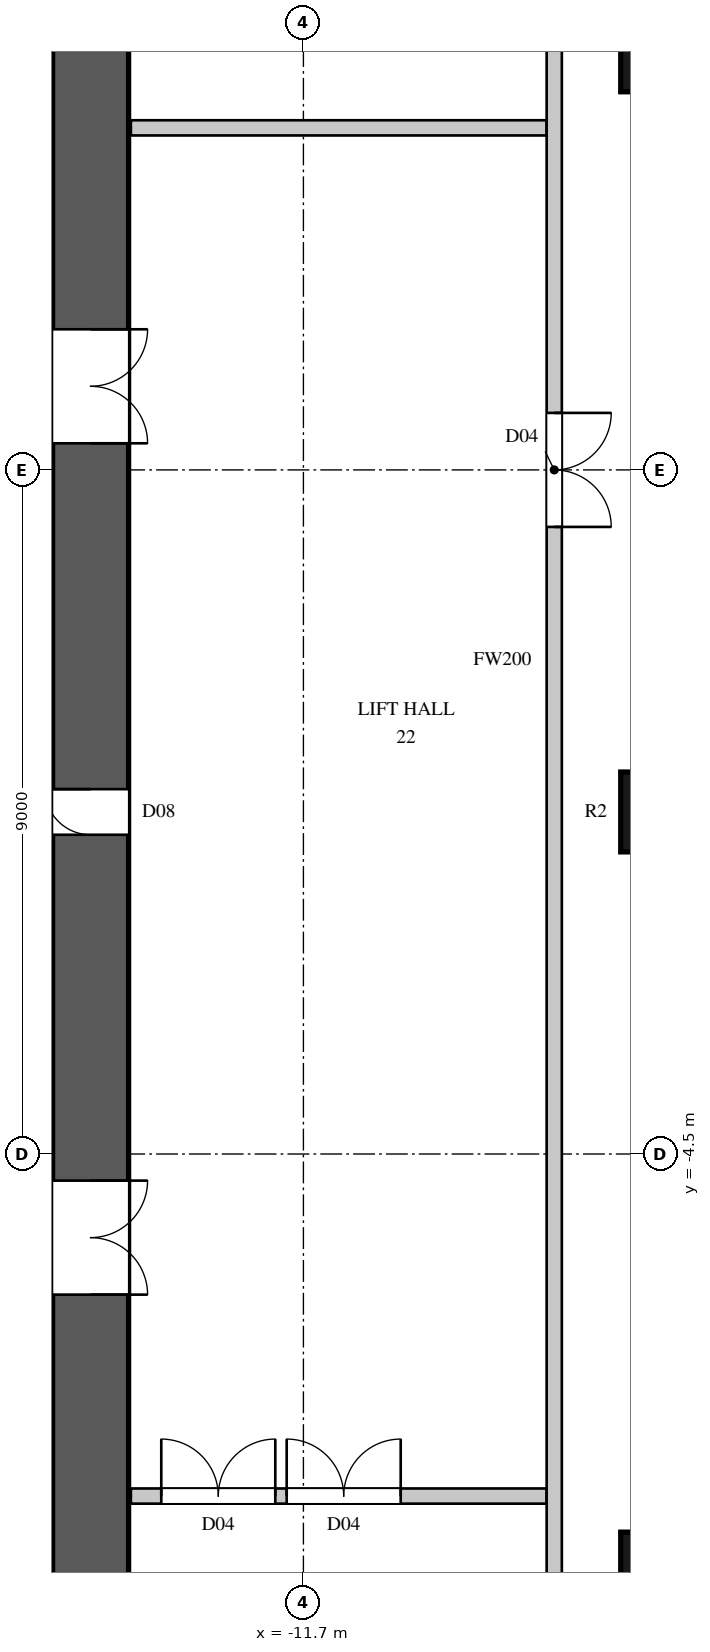
"""IFC4 building model, lengths in metres.
Left out: names, types, materials, properties, quantities, classifications, styles, units other than length and angle.
Written with IfcOpenShell. Run it as: python <this file> out.ifc"""

import sys

from ifc_helpers import new_model, si_unit, direction, frame, frame_2d, origin, origin_2d, place, context, subcontext, project, spatial, rectangle, circle, extrude, element, fill, save


model = new_model("IFC4")
c1 = context("Model", 3, precision=1e-05, world=origin(), true_north=direction((0.0, 1.0)))
c2 = subcontext(c1, "Body", "Model", "MODEL_VIEW")
j1 = project(units=[si_unit("LENGTHUNIT", "METRE"), si_unit("PLANEANGLEUNIT", "RADIAN")], contexts=[c1])
p1 = place(None, origin())
s1 = spatial("IfcSite", under=j1, at=p1, CompositionType="ELEMENT")
p2 = place(p1, origin())
s2 = spatial("IfcBuilding", under=s1, at=p2, CompositionType="ELEMENT")
p3 = place(p2, frame((0.0, 0.0, 109.5)))
s3 = spatial("IfcBuildingStorey", under=s2, at=p3, CompositionType="ELEMENT", Elevation=109.5)
for number, where, z_axis, x_axis in (
    (1, (-7.0, -10.0, 0.0), (0.0, 0.0, 1.0), (1.0, 0.0, 0.0)),
    (2, (-7.0, 0.0, 0.0), (0.0, 0.0, 1.0), (1.0, 0.0, 0.0)),
    (3, (-7.0, 10.0, 0.0), (0.0, 0.0, 1.0), (1.0, 0.0, 0.0)),
):
    element("IfcColumn", number, at=place(p3, frame(where, z_axis=z_axis, x_axis=x_axis)), inside=s3, PredefinedType="COLUMN", context=c2, shape_type="SweptSolid", body=[
        extrude(circle(Radius=0.525, at=origin_2d()), origin(), (0.0, 0.0, 1.0), 3.6),
    ])
p4 = place(p3, frame((-14.5, -14.8, 0.0), z_axis=(0.0, 0.0, 1.0), x_axis=(0.0, 1.0, 0.0)))
e4 = element("IfcWall", 4, at=p4, inside=s3, PredefinedType="SHEAR", context=c2, shape_type="SweptSolid", body=[
    extrude(rectangle(XDim=29.6, YDim=1.0, at=frame_2d((14.8, 0.0))), origin(), (0.0, 0.0, 1.0), 3.6),
])
p5 = place(p4, frame((8.45, 0.0, 0.0)))
e5 = element("IfcOpeningElement", 5, at=p5, cuts=e4, PredefinedType="OPENING", context=c2, shape_type="SweptSolid", body=[
    extrude(rectangle(XDim=1.5, YDim=2.4, at=frame_2d((0.75, 1.2))), frame((0.0, 0.51, 0.0), z_axis=(0.0, -1.0, 0.0), x_axis=(1.0, 0.0, 0.0)), (0.0, 0.0, 1.0), 1.02),
])
p6 = place(p4, frame((19.65, 0.0, 0.0)))
e6 = element("IfcOpeningElement", 6, at=p6, cuts=e4, PredefinedType="OPENING", context=c2, shape_type="SweptSolid", body=[
    extrude(rectangle(XDim=1.5, YDim=2.4, at=frame_2d((0.75, 1.2))), frame((0.0, 0.51, 0.0), z_axis=(0.0, -1.0, 0.0), x_axis=(1.0, 0.0, 0.0)), (0.0, 0.0, 1.0), 1.02),
])
p7 = place(p4, frame((14.5, 0.0, 0.0)))
e7 = element("IfcOpeningElement", 7, at=p7, cuts=e4, PredefinedType="OPENING", context=c2, shape_type="SweptSolid", body=[
    extrude(rectangle(XDim=0.6, YDim=2.0, at=frame_2d((0.3, 1.0))), frame((0.0, 0.51, 0.0), z_axis=(0.0, -1.0, 0.0), x_axis=(1.0, 0.0, 0.0)), (0.0, 0.0, 1.0), 1.02),
])
p8 = place(p3, frame((-13.97, -9.0, 0.0), z_axis=(0.0, 0.0, 1.0), x_axis=(1.0, 0.0, 0.0)))
e8 = element("IfcWall", 8, at=p8, inside=s3, PredefinedType="PARTITIONING", context=c2, shape_type="SweptSolid", body=[
    extrude(rectangle(XDim=5.47, YDim=0.2, at=frame_2d((2.735, 0.0))), origin(), (0.0, 0.0, 1.0), 3.3),
])
p9 = place(p8, frame((0.4, 0.0, 0.0)))
e9 = element("IfcOpeningElement", 9, at=p9, cuts=e8, PredefinedType="OPENING", context=c2, shape_type="SweptSolid", body=[
    extrude(rectangle(XDim=1.5, YDim=2.2, at=frame_2d((0.75, 1.1))), frame((0.0, 0.11, 0.0), z_axis=(0.0, -1.0, 0.0), x_axis=(1.0, 0.0, 0.0)), (0.0, 0.0, 1.0), 0.22),
])
p10 = place(p8, frame((2.05, 0.0, 0.0)))
e10 = element("IfcOpeningElement", 10, at=p10, cuts=e8, PredefinedType="OPENING", context=c2, shape_type="SweptSolid", body=[
    extrude(rectangle(XDim=1.5, YDim=2.2, at=frame_2d((0.75, 1.1))), frame((0.0, 0.11, 0.0), z_axis=(0.0, -1.0, 0.0), x_axis=(1.0, 0.0, 0.0)), (0.0, 0.0, 1.0), 0.22),
])
p11 = place(p3, frame((-13.97, 9.0, 0.0), z_axis=(0.0, 0.0, 1.0), x_axis=(1.0, 0.0, 0.0)))
e11 = element("IfcWall", 11, at=p11, inside=s3, PredefinedType="PARTITIONING", context=c2, shape_type="SweptSolid", body=[
    extrude(rectangle(XDim=5.47, YDim=0.2, at=frame_2d((2.735, 0.0))), origin(), (0.0, 0.0, 1.0), 3.3),
])
p12 = place(p3, frame((-8.4, -11.3, 0.0), z_axis=(0.0, 0.0, 1.0), x_axis=(0.0, 1.0, 0.0)))
e12 = element("IfcWall", 12, at=p12, inside=s3, PredefinedType="PARTITIONING", context=c2, shape_type="SweptSolid", body=[
    extrude(rectangle(XDim=26.6, YDim=0.2, at=frame_2d((13.3, 0.0))), origin(), (0.0, 0.0, 1.0), 3.3),
])
p13 = place(p12, frame((15.05, 0.0, 0.0)))
e13 = element("IfcOpeningElement", 13, at=p13, cuts=e12, PredefinedType="OPENING", context=c2, shape_type="SweptSolid", body=[
    extrude(rectangle(XDim=1.5, YDim=2.2, at=frame_2d((0.75, 1.1))), frame((0.0, 0.11, 0.0), z_axis=(0.0, -1.0, 0.0), x_axis=(1.0, 0.0, 0.0)), (0.0, 0.0, 1.0), 0.22),
])
p14 = place(p12, frame((25.55, 0.0, 0.0)))
e14 = element("IfcOpeningElement", 14, at=p14, cuts=e12, PredefinedType="OPENING", context=c2, shape_type="SweptSolid", body=[
    extrude(rectangle(XDim=0.9, YDim=2.2, at=frame_2d((0.45, 1.1))), frame((0.0, 0.11, 0.0), z_axis=(0.0, -1.0, 0.0), x_axis=(1.0, 0.0, 0.0)), (0.0, 0.0, 1.0), 0.22),
])
p15 = place(p13, origin())
e15 = element("IfcDoor", 15, at=p15, inside=s3, OperationType="DOUBLE_DOOR_SINGLE_SWING", PredefinedType="DOOR", context=c2, shape_type="SweptSolid", body=[
    extrude(rectangle(XDim=1.5, YDim=2.2, at=frame_2d((0.75, 1.1))), frame((0.0, 0.025, 0.0), z_axis=(0.0, -1.0, 0.0), x_axis=(1.0, 0.0, 0.0)), (0.0, 0.0, 1.0), 0.05),
])
fill(e13, e15)
p16 = place(p9, origin())
e16 = element("IfcDoor", 16, at=p16, inside=s3, OperationType="DOUBLE_DOOR_SINGLE_SWING", PredefinedType="DOOR", context=c2, shape_type="SweptSolid", body=[
    extrude(rectangle(XDim=1.5, YDim=2.2, at=frame_2d((0.75, 1.1))), frame((0.0, 0.025, 0.0), z_axis=(0.0, -1.0, 0.0), x_axis=(1.0, 0.0, 0.0)), (0.0, 0.0, 1.0), 0.05),
])
fill(e9, e16)
p17 = place(p10, origin())
e17 = element("IfcDoor", 17, at=p17, inside=s3, OperationType="DOUBLE_DOOR_SINGLE_SWING", PredefinedType="DOOR", context=c2, shape_type="SweptSolid", body=[
    extrude(rectangle(XDim=1.5, YDim=2.2, at=frame_2d((0.75, 1.1))), frame((0.0, 0.025, 0.0), z_axis=(0.0, -1.0, 0.0), x_axis=(1.0, 0.0, 0.0)), (0.0, 0.0, 1.0), 0.05),
])
fill(e10, e17)
p18 = place(p5, origin())
e18 = element("IfcDoor", 18, at=p18, inside=s3, OperationType="DOUBLE_DOOR_SINGLE_SWING", PredefinedType="DOOR", context=c2, shape_type="SweptSolid", body=[
    extrude(rectangle(XDim=1.5, YDim=2.4, at=frame_2d((0.75, 1.2))), frame((0.0, -0.445, 0.0), z_axis=(0.0, -1.0, 0.0), x_axis=(1.0, 0.0, 0.0)), (0.0, 0.0, 1.0), 0.05),
])
fill(e5, e18)
p19 = place(p6, origin())
e19 = element("IfcDoor", 19, at=p19, inside=s3, OperationType="DOUBLE_DOOR_SINGLE_SWING", PredefinedType="DOOR", context=c2, shape_type="SweptSolid", body=[
    extrude(rectangle(XDim=1.5, YDim=2.4, at=frame_2d((0.75, 1.2))), frame((0.0, -0.445, 0.0), z_axis=(0.0, -1.0, 0.0), x_axis=(1.0, 0.0, 0.0)), (0.0, 0.0, 1.0), 0.05),
])
fill(e6, e19)
p20 = place(p7, origin())
e20 = element("IfcDoor", 20, at=p20, inside=s3, OperationType="SINGLE_SWING_RIGHT", PredefinedType="DOOR", context=c2, shape_type="SweptSolid", body=[
    extrude(rectangle(XDim=0.6, YDim=2.0, at=frame_2d((0.3, 1.0))), frame((0.0, 0.495, 0.0), z_axis=(0.0, -1.0, 0.0), x_axis=(1.0, 0.0, 0.0)), (0.0, 0.0, 1.0), 0.05),
])
fill(e7, e20)
save(model, sys.argv[1])
